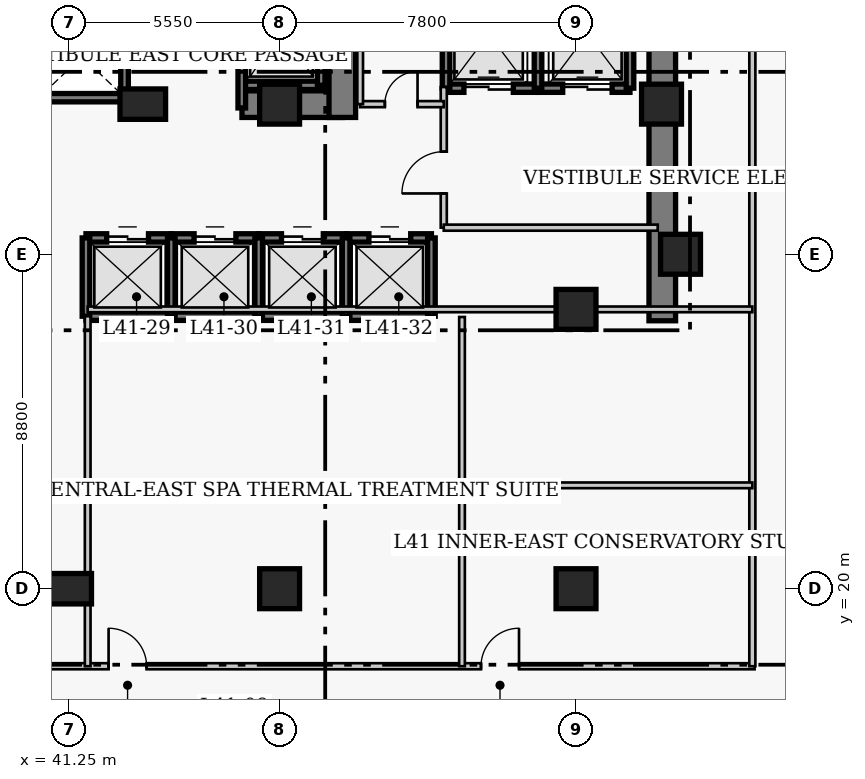
"""IFC4 building model, lengths in metres.
Left out: names, types, materials, properties, quantities, classifications, styles, units other than length and angle.
Written with IfcOpenShell. Run it as: python <this file> out.ifc"""

import sys

from ifc_helpers import new_model, si_unit, direction, frame, frame_2d, origin, origin_2d, place, context, subcontext, project, spatial, rectangle, extrude, element, fill, save


model = new_model("IFC4")
c1 = context("Model", 3, precision=1e-05, world=origin(), true_north=direction((0.0, 1.0)))
c2 = subcontext(c1, "Body", "Model", "MODEL_VIEW")
j1 = project(units=[si_unit("LENGTHUNIT", "METRE"), si_unit("PLANEANGLEUNIT", "RADIAN")], contexts=[c1])
p1 = place(None, origin())
s1 = spatial("IfcSite", under=j1, at=p1, CompositionType="ELEMENT")
p2 = place(p1, origin())
s2 = spatial("IfcBuilding", under=s1, at=p2, CompositionType="ELEMENT")
p3 = place(p2, frame((0.0, 0.0, 165.0)))
s3 = spatial("IfcBuildingStorey", under=s2, at=p3, CompositionType="ELEMENT", Elevation=165.0)
p4 = place(p3, frame((56.87, 27.05, 0.0), z_axis=(0.0, 0.0, 1.0), x_axis=(0.0, 1.0, 0.0)))
e1 = element("IfcWall", 1, at=p4, inside=s3, PredefinedType="SHEAR", context=c2, shape_type="SweptSolid", body=[
    extrude(rectangle(XDim=13.62, YDim=0.7, at=frame_2d((6.81, 0.0))), origin(), (0.0, 0.0, 1.0), 3.8),
])
p5 = place(p3, frame((45.81, 32.75, 0.0), z_axis=(0.0, 0.0, 1.0), x_axis=(1.0, 0.0, 0.0)))
e2 = element("IfcWall", 2, at=p5, inside=s3, PredefinedType="SHEAR", context=c2, shape_type="SweptSolid", body=[
    extrude(rectangle(XDim=2.64, YDim=0.7, at=frame_2d((1.32, 0.0))), origin(), (0.0, 0.0, 1.0), 3.8),
])
p6 = place(p3, frame((48.45, 32.4, 0.0), z_axis=(0.0, 0.0, 1.0), x_axis=(0.0, 1.0, 0.0)))
e3 = element("IfcWall", 3, at=p6, inside=s3, PredefinedType="SHEAR", context=c2, shape_type="SweptSolid", body=[
    extrude(rectangle(XDim=7.92, YDim=0.7, at=frame_2d((3.96, 0.0))), origin(), (0.0, 0.0, 1.0), 3.8),
])
p7 = place(p6, frame((5.8, 0.0, 0.0)))
e4 = element("IfcOpeningElement", 4, at=p7, cuts=e3, PredefinedType="OPENING", context=c2, shape_type="SweptSolid", body=[
    extrude(rectangle(XDim=1.1, YDim=2.15, at=frame_2d((0.55, 1.075))), frame((0.0, 0.36, 0.0), z_axis=(0.0, -1.0, 0.0), x_axis=(1.0, 0.0, 0.0)), (0.0, 0.0, 1.0), 0.72),
])
p8 = place(p3, frame((41.25, 20.0, 0.0), z_axis=(0.0, 0.0, 1.0), x_axis=(1.0, 0.0, 0.0)))
e5 = element("IfcColumn", 5, at=p8, inside=s3, PredefinedType="COLUMN", context=c2, shape_type="SweptSolid", body=[
    extrude(rectangle(XDim=1.2, YDim=0.8, at=origin_2d()), origin(), (0.0, 0.0, 1.0), 3.8),
])
for number, where, z_axis, x_axis in (
    (6, (46.8, 20.0, 0.0), (0.0, 0.0, 1.0), (1.0, 0.0, 0.0)),
    (7, (54.6, 20.0, 0.0), (0.0, 0.0, 1.0), (1.0, 0.0, 0.0)),
    (8, (57.35, 28.8, 0.0), (0.0, 0.0, 1.0), (1.0, 0.0, 0.0)),
):
    element("IfcColumn", number, at=place(p3, frame(where, z_axis=z_axis, x_axis=x_axis)), inside=s3, PredefinedType="COLUMN", context=c2, shape_type="SweptSolid", body=[
        extrude(rectangle(XDim=1.05, YDim=1.05, at=origin_2d()), origin(), (0.0, 0.0, 1.0), 3.8),
    ])
p9 = place(p3, frame((43.2, 32.75, 0.0), z_axis=(0.0, 0.0, 1.0), x_axis=(1.0, 0.0, 0.0)))
e9 = element("IfcColumn", 9, at=p9, inside=s3, PredefinedType="COLUMN", context=c2, shape_type="SweptSolid", body=[
    extrude(rectangle(XDim=1.2, YDim=0.8, at=origin_2d()), origin(), (0.0, 0.0, 1.0), 3.8),
])
for number, where, z_axis, x_axis in (
    (10, (46.8, 32.75, 0.0), (0.0, 0.0, 1.0), (1.0, 0.0, 0.0)),
    (11, (54.6, 27.35, 0.0), (0.0, 0.0, 1.0), (1.0, 0.0, 0.0)),
    (12, (56.85, 32.75, 0.0), (0.0, 0.0, 1.0), (1.0, 0.0, 0.0)),
):
    element("IfcColumn", number, at=place(p3, frame(where, z_axis=z_axis, x_axis=x_axis)), inside=s3, PredefinedType="COLUMN", context=c2, shape_type="SweptSolid", body=[
        extrude(rectangle(XDim=1.05, YDim=1.05, at=origin_2d()), origin(), (0.0, 0.0, 1.0), 3.8),
    ])
p10 = place(p3, frame((41.705, 29.23, 0.0), z_axis=(0.0, 0.0, 1.0), x_axis=(1.0, 0.0, 0.0)))
e13 = element("IfcWall", 13, at=p10, inside=s3, PredefinedType="SHEAR", context=c2, shape_type="SweptSolid", body=[
    extrude(rectangle(XDim=2.245, YDim=0.22, at=frame_2d((1.123, 0.0))), origin(), (0.0, 0.0, 1.0), 3.8),
])
p11 = place(p10, frame((0.545, 0.0, 0.0)))
e14 = element("IfcOpeningElement", 14, at=p11, cuts=e13, PredefinedType="OPENING", context=c2, shape_type="SweptSolid", body=[
    extrude(rectangle(XDim=1.1, YDim=2.15, at=frame_2d((0.55, 1.075))), frame((0.0, 0.12, 0.0), z_axis=(0.0, -1.0, 0.0), x_axis=(1.0, 0.0, 0.0)), (0.0, 0.0, 1.0), 0.24),
])
p12 = place(p3, frame((41.705, 27.17, 0.0), z_axis=(0.0, 0.0, 1.0), x_axis=(1.0, 0.0, 0.0)))
e15 = element("IfcWall", 15, at=p12, inside=s3, PredefinedType="SHEAR", context=c2, shape_type="SweptSolid", body=[
    extrude(rectangle(XDim=2.245, YDim=0.22, at=frame_2d((1.123, 0.0))), origin(), (0.0, 0.0, 1.0), 3.8),
])
p13 = place(p3, frame((41.705, 27.17, 0.0), z_axis=(0.0, 0.0, 1.0), x_axis=(0.0, 1.0, 0.0)))
e16 = element("IfcWall", 16, at=p13, inside=s3, PredefinedType="SHEAR", context=c2, shape_type="SweptSolid", body=[
    extrude(rectangle(XDim=2.06, YDim=0.2, at=frame_2d((1.03, 0.0))), origin(), (0.0, 0.0, 1.0), 3.8),
])
p14 = place(p3, frame((43.95, 29.23, 0.0), z_axis=(0.0, 0.0, 1.0), x_axis=(1.0, 0.0, 0.0)))
e17 = element("IfcWall", 17, at=p14, inside=s3, PredefinedType="SHEAR", context=c2, shape_type="SweptSolid", body=[
    extrude(rectangle(XDim=2.3, YDim=0.22, at=frame_2d((1.15, 0.0))), origin(), (0.0, 0.0, 1.0), 3.8),
])
p15 = place(p14, frame((0.6, 0.0, 0.0)))
e18 = element("IfcOpeningElement", 18, at=p15, cuts=e17, PredefinedType="OPENING", context=c2, shape_type="SweptSolid", body=[
    extrude(rectangle(XDim=1.1, YDim=2.15, at=frame_2d((0.55, 1.075))), frame((0.0, 0.12, 0.0), z_axis=(0.0, -1.0, 0.0), x_axis=(1.0, 0.0, 0.0)), (0.0, 0.0, 1.0), 0.24),
])
p16 = place(p3, frame((43.95, 27.17, 0.0), z_axis=(0.0, 0.0, 1.0), x_axis=(1.0, 0.0, 0.0)))
e19 = element("IfcWall", 19, at=p16, inside=s3, PredefinedType="SHEAR", context=c2, shape_type="SweptSolid", body=[
    extrude(rectangle(XDim=2.3, YDim=0.22, at=frame_2d((1.15, 0.0))), origin(), (0.0, 0.0, 1.0), 3.8),
])
p17 = place(p3, frame((43.95, 27.17, 0.0), z_axis=(0.0, 0.0, 1.0), x_axis=(0.0, 1.0, 0.0)))
e20 = element("IfcWall", 20, at=p17, inside=s3, PredefinedType="SHEAR", context=c2, shape_type="SweptSolid", body=[
    extrude(rectangle(XDim=2.06, YDim=0.2, at=frame_2d((1.03, 0.0))), origin(), (0.0, 0.0, 1.0), 3.8),
])
p18 = place(p3, frame((46.25, 29.23, 0.0), z_axis=(0.0, 0.0, 1.0), x_axis=(1.0, 0.0, 0.0)))
e21 = element("IfcWall", 21, at=p18, inside=s3, PredefinedType="SHEAR", context=c2, shape_type="SweptSolid", body=[
    extrude(rectangle(XDim=2.3, YDim=0.22, at=frame_2d((1.15, 0.0))), origin(), (0.0, 0.0, 1.0), 3.8),
])
p19 = place(p18, frame((0.6, 0.0, 0.0)))
e22 = element("IfcOpeningElement", 22, at=p19, cuts=e21, PredefinedType="OPENING", context=c2, shape_type="SweptSolid", body=[
    extrude(rectangle(XDim=1.1, YDim=2.15, at=frame_2d((0.55, 1.075))), frame((0.0, 0.12, 0.0), z_axis=(0.0, -1.0, 0.0), x_axis=(1.0, 0.0, 0.0)), (0.0, 0.0, 1.0), 0.24),
])
p20 = place(p3, frame((46.25, 27.17, 0.0), z_axis=(0.0, 0.0, 1.0), x_axis=(1.0, 0.0, 0.0)))
e23 = element("IfcWall", 23, at=p20, inside=s3, PredefinedType="SHEAR", context=c2, shape_type="SweptSolid", body=[
    extrude(rectangle(XDim=2.3, YDim=0.22, at=frame_2d((1.15, 0.0))), origin(), (0.0, 0.0, 1.0), 3.8),
])
p21 = place(p3, frame((46.25, 27.17, 0.0), z_axis=(0.0, 0.0, 1.0), x_axis=(0.0, 1.0, 0.0)))
e24 = element("IfcWall", 24, at=p21, inside=s3, PredefinedType="SHEAR", context=c2, shape_type="SweptSolid", body=[
    extrude(rectangle(XDim=2.06, YDim=0.2, at=frame_2d((1.03, 0.0))), origin(), (0.0, 0.0, 1.0), 3.8),
])
p22 = place(p3, frame((48.55, 29.23, 0.0), z_axis=(0.0, 0.0, 1.0), x_axis=(1.0, 0.0, 0.0)))
e25 = element("IfcWall", 25, at=p22, inside=s3, PredefinedType="SHEAR", context=c2, shape_type="SweptSolid", body=[
    extrude(rectangle(XDim=2.245, YDim=0.22, at=frame_2d((1.123, 0.0))), origin(), (0.0, 0.0, 1.0), 3.8),
])
p23 = place(p22, frame((0.6, 0.0, 0.0)))
e26 = element("IfcOpeningElement", 26, at=p23, cuts=e25, PredefinedType="OPENING", context=c2, shape_type="SweptSolid", body=[
    extrude(rectangle(XDim=1.1, YDim=2.15, at=frame_2d((0.55, 1.075))), frame((0.0, 0.12, 0.0), z_axis=(0.0, -1.0, 0.0), x_axis=(1.0, 0.0, 0.0)), (0.0, 0.0, 1.0), 0.24),
])
p24 = place(p3, frame((48.55, 27.17, 0.0), z_axis=(0.0, 0.0, 1.0), x_axis=(1.0, 0.0, 0.0)))
e27 = element("IfcWall", 27, at=p24, inside=s3, PredefinedType="SHEAR", context=c2, shape_type="SweptSolid", body=[
    extrude(rectangle(XDim=2.245, YDim=0.22, at=frame_2d((1.123, 0.0))), origin(), (0.0, 0.0, 1.0), 3.8),
])
for number, where, z_axis, x_axis in (
    (28, (48.55, 27.17, 0.0), (0.0, 0.0, 1.0), (0.0, 1.0, 0.0)),
    (29, (50.795, 27.17, 0.0), (0.0, 0.0, 1.0), (0.0, 1.0, 0.0)),
):
    element("IfcWall", number, at=place(p3, frame(where, z_axis=z_axis, x_axis=x_axis)), inside=s3, PredefinedType="SHEAR", context=c2, shape_type="SweptSolid", body=[
        extrude(rectangle(XDim=2.06, YDim=0.2, at=frame_2d((1.03, 0.0))), origin(), (0.0, 0.0, 1.0), 3.8),
    ])
p25 = place(p3, frame((40.4, 32.92, 0.0), z_axis=(0.0, 0.0, 1.0), x_axis=(1.0, 0.0, 0.0)))
e30 = element("IfcWall", 30, at=p25, inside=s3, PredefinedType="SHEAR", context=c2, shape_type="SweptSolid", body=[
    extrude(rectangle(XDim=2.32, YDim=0.22, at=frame_2d((1.16, 0.0))), origin(), (0.0, 0.0, 1.0), 3.8),
])
p26 = place(p3, frame((42.72, 32.92, 0.0), z_axis=(0.0, 0.0, 1.0), x_axis=(0.0, 1.0, 0.0)))
e31 = element("IfcWall", 31, at=p26, inside=s3, PredefinedType="SHEAR", context=c2, shape_type="SweptSolid", body=[
    extrude(rectangle(XDim=2.16, YDim=0.2, at=frame_2d((1.08, 0.0))), origin(), (0.0, 0.0, 1.0), 3.8),
])
p27 = place(p3, frame((51.18, 33.17, 0.0), z_axis=(0.0, 0.0, 1.0), x_axis=(1.0, 0.0, 0.0)))
e32 = element("IfcWall", 32, at=p27, inside=s3, PredefinedType="SHEAR", context=c2, shape_type="SweptSolid", body=[
    extrude(rectangle(XDim=2.42, YDim=0.22, at=frame_2d((1.21, 0.0))), origin(), (0.0, 0.0, 1.0), 3.8),
])
p28 = place(p27, frame((0.47, 0.0, 0.0)))
e33 = element("IfcOpeningElement", 33, at=p28, cuts=e32, PredefinedType="OPENING", context=c2, shape_type="SweptSolid", body=[
    extrude(rectangle(XDim=1.3, YDim=2.15, at=frame_2d((0.65, 1.075))), frame((0.0, 0.12, 0.0), z_axis=(0.0, -1.0, 0.0), x_axis=(1.0, 0.0, 0.0)), (0.0, 0.0, 1.0), 0.24),
])
p29 = place(p3, frame((51.18, 33.17, 0.0), z_axis=(0.0, 0.0, 1.0), x_axis=(0.0, 1.0, 0.0)))
e34 = element("IfcWall", 34, at=p29, inside=s3, PredefinedType="SHEAR", context=c2, shape_type="SweptSolid", body=[
    extrude(rectangle(XDim=2.86, YDim=0.2, at=frame_2d((1.43, 0.0))), origin(), (0.0, 0.0, 1.0), 3.8),
])
p30 = place(p3, frame((53.6, 33.17, 0.0), z_axis=(0.0, 0.0, 1.0), x_axis=(1.0, 0.0, 0.0)))
e35 = element("IfcWall", 35, at=p30, inside=s3, PredefinedType="SHEAR", context=c2, shape_type="SweptSolid", body=[
    extrude(rectangle(XDim=2.42, YDim=0.22, at=frame_2d((1.21, 0.0))), origin(), (0.0, 0.0, 1.0), 3.8),
])
p31 = place(p30, frame((0.65, 0.0, 0.0)))
e36 = element("IfcOpeningElement", 36, at=p31, cuts=e35, PredefinedType="OPENING", context=c2, shape_type="SweptSolid", body=[
    extrude(rectangle(XDim=1.3, YDim=2.15, at=frame_2d((0.65, 1.075))), frame((0.0, 0.12, 0.0), z_axis=(0.0, -1.0, 0.0), x_axis=(1.0, 0.0, 0.0)), (0.0, 0.0, 1.0), 0.24),
])
for number, where, z_axis, x_axis in (
    (37, (53.6, 33.17, 0.0), (0.0, 0.0, 1.0), (0.0, 1.0, 0.0)),
    (38, (56.02, 33.17, 0.0), (0.0, 0.0, 1.0), (0.0, 1.0, 0.0)),
):
    element("IfcWall", number, at=place(p3, frame(where, z_axis=z_axis, x_axis=x_axis)), inside=s3, PredefinedType="SHEAR", context=c2, shape_type="SweptSolid", body=[
        extrude(rectangle(XDim=2.86, YDim=0.2, at=frame_2d((1.43, 0.0))), origin(), (0.0, 0.0, 1.0), 3.8),
    ])
p32 = place(p3, frame((45.805, 33.245, 0.0), z_axis=(0.0, 0.0, 1.0), x_axis=(1.0, 0.0, 0.0)))
e39 = element("IfcWall", 39, at=p32, inside=s3, PredefinedType="SHEAR", context=c2, shape_type="SweptSolid", body=[
    extrude(rectangle(XDim=2.09, YDim=0.22, at=frame_2d((1.045, 0.0))), origin(), (0.0, 0.0, 1.0), 3.8),
])
p33 = place(p3, frame((45.805, 32.65, 0.0), z_axis=(0.0, 0.0, 1.0), x_axis=(0.0, 1.0, 0.0)))
e40 = element("IfcWall", 40, at=p33, inside=s3, PredefinedType="SHEAR", context=c2, shape_type="SweptSolid", body=[
    extrude(rectangle(XDim=3.505, YDim=0.2, at=frame_2d((1.752, 0.0))), origin(), (0.0, 0.0, 1.0), 3.8),
])
p34 = place(p3, frame((47.895, 33.245, 0.0), z_axis=(0.0, 0.0, 1.0), x_axis=(0.0, 1.0, 0.0)))
e41 = element("IfcWall", 41, at=p34, inside=s3, PredefinedType="SHEAR", context=c2, shape_type="SweptSolid", body=[
    extrude(rectangle(XDim=2.91, YDim=0.2, at=frame_2d((1.455, 0.0))), origin(), (0.0, 0.0, 1.0), 3.8),
])
p35 = place(p3, frame((51.12, 29.5, 0.0), z_axis=(0.0, 0.0, 1.0), x_axis=(0.0, 1.0, 0.0)))
e42 = element("IfcWall", 42, at=p35, inside=s3, PredefinedType="PARTITIONING", context=c2, shape_type="SweptSolid", body=[
    extrude(rectangle(XDim=3.7, YDim=0.16, at=frame_2d((1.85, 0.0))), origin(), (0.0, 0.0, 1.0), 3.55),
])
p36 = place(p35, frame((0.9, 0.0, 0.0)))
e43 = element("IfcOpeningElement", 43, at=p36, cuts=e42, PredefinedType="OPENING", context=c2, shape_type="SweptSolid", body=[
    extrude(rectangle(XDim=1.1, YDim=2.15, at=frame_2d((0.55, 1.075))), frame((0.0, 0.09, 0.0), z_axis=(0.0, -1.0, 0.0), x_axis=(1.0, 0.0, 0.0)), (0.0, 0.0, 1.0), 0.18),
])
p37 = place(p3, frame((51.12, 29.5, 0.0), z_axis=(0.0, 0.0, 1.0), x_axis=(1.0, 0.0, 0.0)))
e44 = element("IfcWall", 44, at=p37, inside=s3, PredefinedType="PARTITIONING", context=c2, shape_type="SweptSolid", body=[
    extrude(rectangle(XDim=5.63, YDim=0.16, at=frame_2d((2.815, 0.0))), origin(), (0.0, 0.0, 1.0), 3.55),
])
p38 = place(p3, frame((48.92, 32.75, 0.0), z_axis=(0.0, 0.0, 1.0), x_axis=(1.0, 0.0, 0.0)))
e45 = element("IfcWall", 45, at=p38, inside=s3, PredefinedType="PARTITIONING", context=c2, shape_type="SweptSolid", body=[
    extrude(rectangle(XDim=2.2, YDim=0.16, at=frame_2d((1.1, 0.0))), origin(), (0.0, 0.0, 1.0), 3.55),
])
p39 = place(p38, frame((0.65, 0.0, 0.0)))
e46 = element("IfcOpeningElement", 46, at=p39, cuts=e45, PredefinedType="OPENING", context=c2, shape_type="SweptSolid", body=[
    extrude(rectangle(XDim=0.86, YDim=2.05, at=frame_2d((0.43, 1.025))), frame((0.0, 0.09, 0.0), z_axis=(0.0, -1.0, 0.0), x_axis=(1.0, 0.0, 0.0)), (0.0, 0.0, 1.0), 0.18),
])
p40 = place(p3, frame((48.92, 32.75, 0.0), z_axis=(0.0, 0.0, 1.0), x_axis=(0.0, 1.0, 0.0)))
e47 = element("IfcWall", 47, at=p40, inside=s3, PredefinedType="PARTITIONING", context=c2, shape_type="SweptSolid", body=[
    extrude(rectangle(XDim=3.62, YDim=0.15, at=frame_2d((1.81, 0.0))), origin(), (0.0, 0.0, 1.0), 3.55),
])
p41 = place(p3, frame((35.85, 17.96, 0.0), z_axis=(0.0, 0.0, 1.0), x_axis=(1.0, 0.0, 0.0)))
e48 = element("IfcWall", 48, at=p41, inside=s3, PredefinedType="PARTITIONING", context=c2, shape_type="SweptSolid", body=[
    extrude(rectangle(XDim=23.45, YDim=0.16, at=frame_2d((11.725, 0.0))), origin(), (0.0, 0.0, 1.0), 3.55),
])
p42 = place(p41, frame((6.45, 0.0, 0.0)))
e49 = element("IfcOpeningElement", 49, at=p42, cuts=e48, PredefinedType="OPENING", context=c2, shape_type="SweptSolid", body=[
    extrude(rectangle(XDim=1.0, YDim=2.15, at=frame_2d((0.5, 1.075))), frame((0.0, 0.09, 0.0), z_axis=(0.0, -1.0, 0.0), x_axis=(1.0, 0.0, 0.0)), (0.0, 0.0, 1.0), 0.18),
])
p43 = place(p41, frame((16.25, 0.0, 0.0)))
e50 = element("IfcOpeningElement", 50, at=p43, cuts=e48, PredefinedType="OPENING", context=c2, shape_type="SweptSolid", body=[
    extrude(rectangle(XDim=1.0, YDim=2.15, at=frame_2d((0.5, 1.075))), frame((0.0, 0.09, 0.0), z_axis=(0.0, -1.0, 0.0), x_axis=(1.0, 0.0, 0.0)), (0.0, 0.0, 1.0), 0.18),
])
p44 = place(p3, frame((59.24, 17.96, 0.0), z_axis=(0.0, 0.0, 1.0), x_axis=(0.0, 1.0, 0.0)))
e51 = element("IfcWall", 51, at=p44, inside=s3, PredefinedType="PARTITIONING", context=c2, shape_type="SweptSolid", body=[
    extrude(rectangle(XDim=22.69, YDim=0.16, at=frame_2d((11.345, 0.0))), origin(), (0.0, 0.0, 1.0), 3.55),
])
p45 = place(p3, frame((41.75, 17.96, 0.0), z_axis=(0.0, 0.0, 1.0), x_axis=(0.0, 1.0, 0.0)))
e52 = element("IfcWall", 52, at=p45, inside=s3, PredefinedType="PARTITIONING", context=c2, shape_type="SweptSolid", body=[
    extrude(rectangle(XDim=9.21, YDim=0.15, at=frame_2d((4.605, 0.0))), origin(), (0.0, 0.0, 1.0), 3.55),
])
p46 = place(p3, frame((51.6, 17.96, 0.0), z_axis=(0.0, 0.0, 1.0), x_axis=(0.0, 1.0, 0.0)))
e53 = element("IfcWall", 53, at=p46, inside=s3, PredefinedType="PARTITIONING", context=c2, shape_type="SweptSolid", body=[
    extrude(rectangle(XDim=9.19, YDim=0.15, at=frame_2d((4.595, 0.0))), origin(), (0.0, 0.0, 1.0), 3.55),
])
p47 = place(p3, frame((41.75, 27.35, 0.0), z_axis=(0.0, 0.0, 1.0), x_axis=(1.0, 0.0, 0.0)))
e54 = element("IfcWall", 54, at=p47, inside=s3, PredefinedType="PARTITIONING", context=c2, shape_type="SweptSolid", body=[
    extrude(rectangle(XDim=17.49, YDim=0.15, at=frame_2d((8.745, 0.0))), origin(), (0.0, 0.0, 1.0), 3.55),
])
p48 = place(p3, frame((51.6, 22.72, 0.0), z_axis=(0.0, 0.0, 1.0), x_axis=(1.0, 0.0, 0.0)))
e55 = element("IfcWall", 55, at=p48, inside=s3, PredefinedType="PARTITIONING", context=c2, shape_type="SweptSolid", body=[
    extrude(rectangle(XDim=7.64, YDim=0.15, at=frame_2d((3.82, 0.0))), origin(), (0.0, 0.0, 1.0), 3.55),
])
p49 = place(p11, origin())
e56 = element("IfcDoor", 56, at=p49, inside=s3, OperationType="DOUBLE_DOOR_SLIDING", PredefinedType="DOOR", context=c2, shape_type="SweptSolid", body=[
    extrude(rectangle(XDim=1.1, YDim=2.15, at=frame_2d((0.55, 1.075))), frame((0.0, 0.025, 0.0), z_axis=(0.0, -1.0, 0.0), x_axis=(1.0, 0.0, 0.0)), (0.0, 0.0, 1.0), 0.05),
])
fill(e14, e56)
p50 = place(p15, origin())
e57 = element("IfcDoor", 57, at=p50, inside=s3, OperationType="DOUBLE_DOOR_SLIDING", PredefinedType="DOOR", context=c2, shape_type="SweptSolid", body=[
    extrude(rectangle(XDim=1.1, YDim=2.15, at=frame_2d((0.55, 1.075))), frame((0.0, 0.025, 0.0), z_axis=(0.0, -1.0, 0.0), x_axis=(1.0, 0.0, 0.0)), (0.0, 0.0, 1.0), 0.05),
])
fill(e18, e57)
p51 = place(p19, origin())
e58 = element("IfcDoor", 58, at=p51, inside=s3, OperationType="DOUBLE_DOOR_SLIDING", PredefinedType="DOOR", context=c2, shape_type="SweptSolid", body=[
    extrude(rectangle(XDim=1.1, YDim=2.15, at=frame_2d((0.55, 1.075))), frame((0.0, 0.025, 0.0), z_axis=(0.0, -1.0, 0.0), x_axis=(1.0, 0.0, 0.0)), (0.0, 0.0, 1.0), 0.05),
])
fill(e22, e58)
p52 = place(p23, origin())
e59 = element("IfcDoor", 59, at=p52, inside=s3, OperationType="DOUBLE_DOOR_SLIDING", PredefinedType="DOOR", context=c2, shape_type="SweptSolid", body=[
    extrude(rectangle(XDim=1.1, YDim=2.15, at=frame_2d((0.55, 1.075))), frame((0.0, 0.025, 0.0), z_axis=(0.0, -1.0, 0.0), x_axis=(1.0, 0.0, 0.0)), (0.0, 0.0, 1.0), 0.05),
])
fill(e26, e59)
p53 = place(p28, origin())
e60 = element("IfcDoor", 60, at=p53, inside=s3, OperationType="DOUBLE_DOOR_SLIDING", PredefinedType="DOOR", context=c2, shape_type="SweptSolid", body=[
    extrude(rectangle(XDim=1.3, YDim=2.15, at=frame_2d((0.65, 1.075))), frame((0.0, 0.025, 0.0), z_axis=(0.0, -1.0, 0.0), x_axis=(1.0, 0.0, 0.0)), (0.0, 0.0, 1.0), 0.05),
])
fill(e33, e60)
p54 = place(p31, origin())
e61 = element("IfcDoor", 61, at=p54, inside=s3, OperationType="DOUBLE_DOOR_SLIDING", PredefinedType="DOOR", context=c2, shape_type="SweptSolid", body=[
    extrude(rectangle(XDim=1.3, YDim=2.15, at=frame_2d((0.65, 1.075))), frame((0.0, 0.025, 0.0), z_axis=(0.0, -1.0, 0.0), x_axis=(1.0, 0.0, 0.0)), (0.0, 0.0, 1.0), 0.05),
])
fill(e36, e61)
p55 = place(p36, origin())
e62 = element("IfcDoor", 62, at=p55, inside=s3, OperationType="SINGLE_SWING_LEFT", PredefinedType="DOOR", context=c2, shape_type="SweptSolid", body=[
    extrude(rectangle(XDim=1.1, YDim=2.15, at=frame_2d((0.55, 1.075))), frame((0.0, 0.025, 0.0), z_axis=(0.0, -1.0, 0.0), x_axis=(1.0, 0.0, 0.0)), (0.0, 0.0, 1.0), 0.05),
])
fill(e43, e62)
p56 = place(p39, origin())
e63 = element("IfcDoor", 63, at=p56, inside=s3, OperationType="SINGLE_SWING_RIGHT", PredefinedType="DOOR", context=c2, shape_type="SweptSolid", body=[
    extrude(rectangle(XDim=0.86, YDim=2.05, at=frame_2d((0.43, 1.025))), frame((0.0, 0.025, 0.0), z_axis=(0.0, -1.0, 0.0), x_axis=(1.0, 0.0, 0.0)), (0.0, 0.0, 1.0), 0.05),
])
fill(e46, e63)
p57 = place(p42, origin())
e64 = element("IfcDoor", 64, at=p57, inside=s3, OperationType="SINGLE_SWING_LEFT", PredefinedType="DOOR", context=c2, shape_type="SweptSolid", body=[
    extrude(rectangle(XDim=1.0, YDim=2.15, at=frame_2d((0.5, 1.075))), frame((0.0, 0.025, 0.0), z_axis=(0.0, -1.0, 0.0), x_axis=(1.0, 0.0, 0.0)), (0.0, 0.0, 1.0), 0.05),
])
fill(e49, e64)
p58 = place(p43, origin())
e65 = element("IfcDoor", 65, at=p58, inside=s3, OperationType="SINGLE_SWING_RIGHT", PredefinedType="DOOR", context=c2, shape_type="SweptSolid", body=[
    extrude(rectangle(XDim=1.0, YDim=2.15, at=frame_2d((0.5, 1.075))), frame((0.0, 0.025, 0.0), z_axis=(0.0, -1.0, 0.0), x_axis=(1.0, 0.0, 0.0)), (0.0, 0.0, 1.0), 0.05),
])
fill(e50, e65)
save(model, sys.argv[1])
